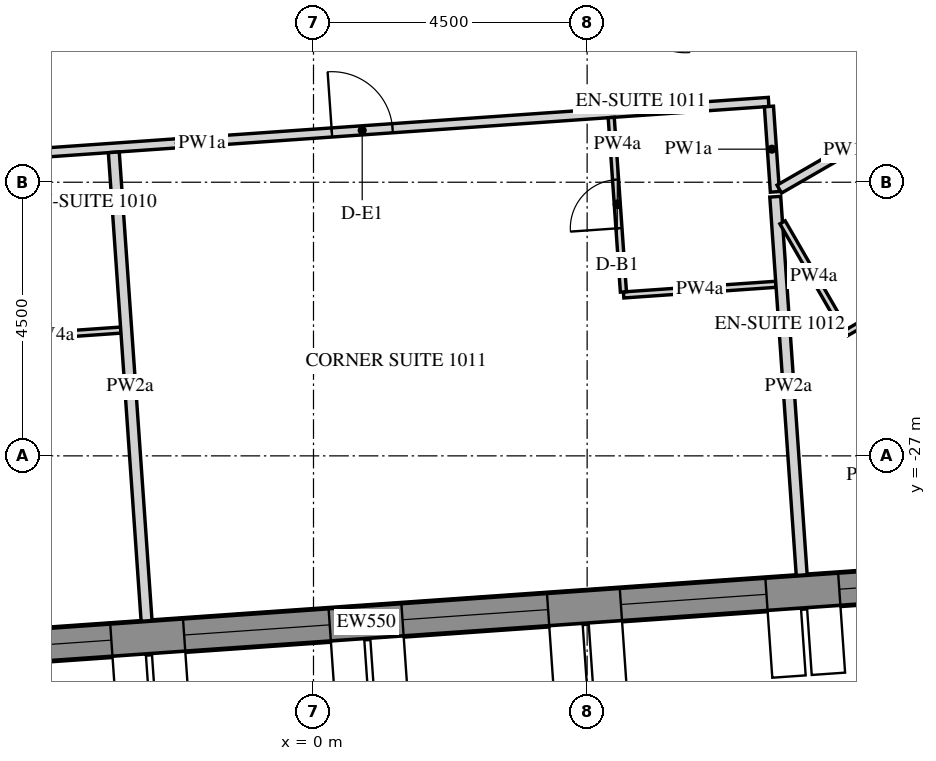
"""IFC4 building model, lengths in metres.
Left out: names, types, materials, properties, quantities, classifications, styles, units other than length and angle.
Written with IfcOpenShell. Run it as: python <this file> out.ifc"""

import sys

from ifc_helpers import new_model, si_unit, direction, frame, frame_2d, origin, place, context, subcontext, project, spatial, polyline, rectangle, outline, extrude, element, fill, save


model = new_model("IFC4")
c1 = context("Model", 3, precision=1e-05, world=origin(), true_north=direction((0.0, 1.0)))
c2 = subcontext(c1, "Body", "Model", "MODEL_VIEW")
j1 = project(units=[si_unit("LENGTHUNIT", "METRE"), si_unit("PLANEANGLEUNIT", "RADIAN")], contexts=[c1])
p1 = place(None, origin())
s1 = spatial("IfcSite", under=j1, at=p1, CompositionType="ELEMENT")
p2 = place(p1, origin())
s2 = spatial("IfcBuilding", under=s1, at=p2, CompositionType="ELEMENT")
p3 = place(p2, frame((0.0, 0.0, 135.0)))
s3 = spatial("IfcBuildingStorey", under=s2, at=p3, CompositionType="ELEMENT", Elevation=135.0)
p4 = place(p3, frame((-14.134, -30.786, -0.15), z_axis=(0.0, 0.0, 1.0), x_axis=(0.997564037441, 0.069756657061, 0.0)))
e1 = element("IfcWall", 1, at=p4, inside=s3, PredefinedType="SOLIDWALL", context=c2, shape_type="SweptSolid", body=[
    extrude(outline(polyline([(-0.026, -0.275), (30.094, -0.275), (30.049, 0.275), (0.026, 0.275), (-0.026, -0.275)])), origin(), (0.0, 0.0, 1.0), 3.9),
])
p5 = place(p4, frame((1.236, 0.0, 1.05)))
e2 = element("IfcOpeningElement", 2, at=p5, cuts=e1, PredefinedType="OPENING", context=c2, shape_type="SweptSolid", body=[
    extrude(rectangle(XDim=2.4, YDim=2.4, at=frame_2d((1.2, 1.2))), frame((0.0, 0.285, 0.0), z_axis=(0.0, -1.0, 0.0), x_axis=(1.0, 0.0, 0.0)), (0.0, 0.0, 1.0), 0.57),
])
p6 = place(p4, frame((4.835, 0.0, 1.05)))
e3 = element("IfcOpeningElement", 3, at=p6, cuts=e1, PredefinedType="OPENING", context=c2, shape_type="SweptSolid", body=[
    extrude(rectangle(XDim=2.4, YDim=2.4, at=frame_2d((1.2, 1.2))), frame((0.0, 0.285, 0.0), z_axis=(0.0, -1.0, 0.0), x_axis=(1.0, 0.0, 0.0)), (0.0, 0.0, 1.0), 0.57),
])
p7 = place(p4, frame((8.436, 0.0, 1.05)))
e4 = element("IfcOpeningElement", 4, at=p7, cuts=e1, PredefinedType="OPENING", context=c2, shape_type="SweptSolid", body=[
    extrude(rectangle(XDim=2.4, YDim=2.4, at=frame_2d((1.2, 1.2))), frame((0.0, 0.285, 0.0), z_axis=(0.0, -1.0, 0.0), x_axis=(1.0, 0.0, 0.0)), (0.0, 0.0, 1.0), 0.57),
])
p8 = place(p4, frame((12.035, 0.0, 1.05)))
e5 = element("IfcOpeningElement", 5, at=p8, cuts=e1, PredefinedType="OPENING", context=c2, shape_type="SweptSolid", body=[
    extrude(rectangle(XDim=2.4, YDim=2.4, at=frame_2d((1.2, 1.2))), frame((0.0, 0.285, 0.0), z_axis=(0.0, -1.0, 0.0), x_axis=(1.0, 0.0, 0.0)), (0.0, 0.0, 1.0), 0.57),
])
p9 = place(p4, frame((15.635, 0.0, 1.05)))
e6 = element("IfcOpeningElement", 6, at=p9, cuts=e1, PredefinedType="OPENING", context=c2, shape_type="SweptSolid", body=[
    extrude(rectangle(XDim=2.4, YDim=2.4, at=frame_2d((1.2, 1.2))), frame((0.0, 0.285, 0.0), z_axis=(0.0, -1.0, 0.0), x_axis=(1.0, 0.0, 0.0)), (0.0, 0.0, 1.0), 0.57),
])
p10 = place(p4, frame((19.236, 0.0, 1.05)))
e7 = element("IfcOpeningElement", 7, at=p10, cuts=e1, PredefinedType="OPENING", context=c2, shape_type="SweptSolid", body=[
    extrude(rectangle(XDim=2.4, YDim=2.4, at=frame_2d((1.2, 1.2))), frame((0.0, 0.285, 0.0), z_axis=(0.0, -1.0, 0.0), x_axis=(1.0, 0.0, 0.0)), (0.0, 0.0, 1.0), 0.57),
])
p11 = place(p4, frame((22.835, 0.0, 1.05)))
e8 = element("IfcOpeningElement", 8, at=p11, cuts=e1, PredefinedType="OPENING", context=c2, shape_type="SweptSolid", body=[
    extrude(rectangle(XDim=2.4, YDim=2.4, at=frame_2d((1.2, 1.2))), frame((0.0, 0.285, 0.0), z_axis=(0.0, -1.0, 0.0), x_axis=(1.0, 0.0, 0.0)), (0.0, 0.0, 1.0), 0.57),
])
p12 = place(p4, frame((26.436, 0.0, 1.05)))
e9 = element("IfcOpeningElement", 9, at=p12, cuts=e1, PredefinedType="OPENING", context=c2, shape_type="SweptSolid", body=[
    extrude(rectangle(XDim=2.4, YDim=2.4, at=frame_2d((1.2, 1.2))), frame((0.0, 0.285, 0.0), z_axis=(0.0, -1.0, 0.0), x_axis=(1.0, 0.0, 0.0)), (0.0, 0.0, 1.0), 0.57),
])
p13 = place(p3, frame((8.083, -14.0, -0.15), z_axis=(0.0, 0.0, 1.0), x_axis=(0.499997680643, -0.866026742862, 0.0)))
e10 = element("IfcWall", 10, at=p13, inside=s3, PredefinedType="SHEAR", context=c2, shape_type="SweptSolid", body=[
    extrude(rectangle(XDim=16.509, YDim=0.6, at=frame_2d((8.254, 0.0))), origin(), (0.0, 0.0, 1.0), 3.9),
])
p14 = place(p13, frame((7.354, 0.0, 0.15)))
e11 = element("IfcOpeningElement", 11, at=p14, cuts=e10, PredefinedType="OPENING", context=c2, shape_type="SweptSolid", body=[
    extrude(rectangle(XDim=1.8, YDim=2.4, at=frame_2d((0.9, 1.2))), frame((0.0, 0.31, 0.0), z_axis=(0.0, -1.0, 0.0), x_axis=(1.0, 0.0, 0.0)), (0.0, 0.0, 1.0), 0.62),
])
p15 = place(p3, frame((-11.902, -22.535, 0.0), z_axis=(0.0, 0.0, 1.0), x_axis=(0.997563830208, 0.069759620556, 0.0)))
e12 = element("IfcWall", 12, at=p15, inside=s3, PredefinedType="PARTITIONING", context=c2, shape_type="SweptSolid", body=[
    extrude(rectangle(XDim=19.434, YDim=0.15, at=frame_2d((9.717, 0.0))), origin(), (0.0, 0.0, 1.0), 2.838),
])
p16 = place(p15, frame((2.575, 0.0, 0.0)))
e13 = element("IfcOpeningElement", 13, at=p16, cuts=e12, PredefinedType="OPENING", context=c2, shape_type="SweptSolid", body=[
    extrude(rectangle(XDim=1.0, YDim=2.1, at=frame_2d((0.5, 1.05))), frame((0.0, 0.085, 0.0), z_axis=(0.0, -1.0, 0.0), x_axis=(1.0, 0.0, 0.0)), (0.0, 0.0, 1.0), 0.17),
])
p17 = place(p15, frame((12.234, 0.0, 0.0)))
e14 = element("IfcOpeningElement", 14, at=p17, cuts=e12, PredefinedType="OPENING", context=c2, shape_type="SweptSolid", body=[
    extrude(rectangle(XDim=1.0, YDim=2.1, at=frame_2d((0.5, 1.05))), frame((0.0, 0.085, 0.0), z_axis=(0.0, -1.0, 0.0), x_axis=(1.0, 0.0, 0.0)), (0.0, 0.0, 1.0), 0.17),
])
p18 = place(p3, frame((7.49, -21.254, 0.0), z_axis=(0.0, 0.0, 1.0), x_axis=(0.069718673592, -0.997566692784, 0.0)))
e15 = element("IfcWall", 15, at=p18, inside=s3, PredefinedType="PARTITIONING", context=c2, shape_type="SweptSolid", body=[
    extrude(rectangle(XDim=1.408, YDim=0.15, at=frame_2d((0.704, 0.0))), origin(), (0.0, 0.0, 1.0), 2.838),
])
p19 = place(p3, frame((7.66, -22.613, 0.0), z_axis=(0.0, 0.0, 1.0), x_axis=(0.866003870164, 0.500037295471, 0.0)))
e16 = element("IfcWall", 16, at=p19, inside=s3, PredefinedType="PARTITIONING", context=c2, shape_type="SweptSolid", body=[
    extrude(rectangle(XDim=2.573, YDim=0.15, at=frame_2d((1.287, 0.0))), origin(), (0.0, 0.0, 1.0), 2.838),
])
p20 = place(p3, frame((-0.825, -19.956, 0.0), z_axis=(0.0, 0.0, 1.0), x_axis=(-0.997562587881, -0.069777383582, 0.0)))
e17 = element("IfcWall", 17, at=p20, inside=s3, PredefinedType="PARTITIONING", context=c2, shape_type="SweptSolid", body=[
    extrude(rectangle(XDim=10.189, YDim=0.15, at=frame_2d((5.094, 0.0))), origin(), (0.0, 0.0, 1.0), 2.838),
])
p21 = place(p3, frame((-3.17, -24.932, 0.0), z_axis=(0.0, 0.0, 1.0), x_axis=(-0.997564338377, -0.069752353356, 0.0)))
e18 = element("IfcWall", 18, at=p21, inside=s3, PredefinedType="PARTITIONING", context=c2, shape_type="SweptSolid", body=[
    extrude(rectangle(XDim=2.31, YDim=0.1, at=frame_2d((1.155, 0.0))), origin(), (0.0, 0.0, 1.0), 2.838),
])
p22 = place(p3, frame((-2.745, -29.714, 0.0), z_axis=(0.0, 0.0, 1.0), x_axis=(-0.069748931501, 0.997564577636, 0.0)))
e19 = element("IfcWall", 19, at=p22, inside=s3, PredefinedType="PARTITIONING", context=c2, shape_type="SweptSolid", body=[
    extrude(rectangle(XDim=7.725, YDim=0.18, at=frame_2d((3.863, 0.0))), origin(), (0.0, 0.0, 1.0), 2.838),
])
p23 = place(p3, frame((7.604, -24.178, 0.0), z_axis=(0.0, 0.0, 1.0), x_axis=(-0.997565196586, -0.069740078583, 0.0)))
e20 = element("IfcWall", 20, at=p23, inside=s3, PredefinedType="PARTITIONING", context=c2, shape_type="SweptSolid", body=[
    extrude(rectangle(XDim=2.51, YDim=0.1, at=frame_2d((1.255, 0.0))), origin(), (0.0, 0.0, 1.0), 2.838),
])
p24 = place(p3, frame((5.097, -24.304, 0.0), z_axis=(0.0, 0.0, 1.0), x_axis=(-0.069804620828, 0.99756068232, 0.0)))
e21 = element("IfcWall", 21, at=p24, inside=s3, PredefinedType="PARTITIONING", context=c2, shape_type="SweptSolid", body=[
    extrude(rectangle(XDim=2.875, YDim=0.1, at=frame_2d((1.438, 0.0))), origin(), (0.0, 0.0, 1.0), 2.838),
])
p25 = place(p24, frame((1.05, 0.0, 0.0)))
e22 = element("IfcOpeningElement", 22, at=p25, cuts=e21, PredefinedType="OPENING", context=c2, shape_type="SweptSolid", body=[
    extrude(rectangle(XDim=0.8, YDim=2.1, at=frame_2d((0.4, 1.05))), frame((0.0, 0.06, 0.0), z_axis=(0.0, -1.0, 0.0), x_axis=(1.0, 0.0, 0.0)), (0.0, 0.0, 1.0), 0.12),
])
p26 = place(p3, frame((8.029, -28.96, 0.0), z_axis=(0.0, 0.0, 1.0), x_axis=(-0.069750446855, 0.997564471683, 0.0)))
e23 = element("IfcWall", 23, at=p26, inside=s3, PredefinedType="PARTITIONING", context=c2, shape_type="SweptSolid", body=[
    extrude(rectangle(XDim=6.237, YDim=0.18, at=frame_2d((3.119, 0.0))), origin(), (0.0, 0.0, 1.0), 2.838),
])
p27 = place(p3, frame((11.123, -23.616, 0.0), z_axis=(0.0, 0.0, 1.0), x_axis=(-0.866034909742, -0.499983534837, 0.0)))
e24 = element("IfcWall", 24, at=p27, inside=s3, PredefinedType="PARTITIONING", context=c2, shape_type="SweptSolid", body=[
    extrude(rectangle(XDim=2.725, YDim=0.1, at=frame_2d((1.363, 0.0))), origin(), (0.0, 0.0, 1.0), 2.838),
])
p28 = place(p27, frame((1.065, 0.0, 0.0)))
e25 = element("IfcOpeningElement", 25, at=p28, cuts=e24, PredefinedType="OPENING", context=c2, shape_type="SweptSolid", body=[
    extrude(rectangle(XDim=0.8, YDim=2.1, at=frame_2d((0.4, 1.05))), frame((0.0, 0.06, 0.0), z_axis=(0.0, -1.0, 0.0), x_axis=(1.0, 0.0, 0.0)), (0.0, 0.0, 1.0), 0.12),
])
p29 = place(p3, frame((8.738, -24.935, 0.0), z_axis=(0.0, 0.0, 1.0), x_axis=(-0.500045446624, 0.865999163574, 0.0)))
e26 = element("IfcWall", 26, at=p29, inside=s3, PredefinedType="PARTITIONING", context=c2, shape_type="SweptSolid", body=[
    extrude(rectangle(XDim=2.05, YDim=0.1, at=frame_2d((1.025, 0.0))), origin(), (0.0, 0.0, 1.0), 2.838),
])
p30 = place(p7, frame((0.0, 0.205, 0.0)))
e27 = element("IfcWindow", 27, at=p30, inside=s3, PartitioningType="DOUBLE_PANEL_VERTICAL", PredefinedType="WINDOW", context=c2, shape_type="SweptSolid", body=[
    extrude(rectangle(XDim=2.4, YDim=2.4, at=frame_2d((1.2, 1.2))), frame((0.0, 0.03, 0.0), z_axis=(0.0, -1.0, 0.0), x_axis=(1.0, 0.0, 0.0)), (0.0, 0.0, 1.0), 0.06),
])
fill(e4, e27)
p31 = place(p8, frame((0.0, 0.205, 0.0)))
e28 = element("IfcWindow", 28, at=p31, inside=s3, PartitioningType="DOUBLE_PANEL_VERTICAL", PredefinedType="WINDOW", context=c2, shape_type="SweptSolid", body=[
    extrude(rectangle(XDim=2.4, YDim=2.4, at=frame_2d((1.2, 1.2))), frame((0.0, 0.03, 0.0), z_axis=(0.0, -1.0, 0.0), x_axis=(1.0, 0.0, 0.0)), (0.0, 0.0, 1.0), 0.06),
])
fill(e5, e28)
p32 = place(p9, frame((0.0, 0.205, 0.0)))
e29 = element("IfcWindow", 29, at=p32, inside=s3, PartitioningType="DOUBLE_PANEL_VERTICAL", PredefinedType="WINDOW", context=c2, shape_type="SweptSolid", body=[
    extrude(rectangle(XDim=2.4, YDim=2.4, at=frame_2d((1.2, 1.2))), frame((0.0, 0.03, 0.0), z_axis=(0.0, -1.0, 0.0), x_axis=(1.0, 0.0, 0.0)), (0.0, 0.0, 1.0), 0.06),
])
fill(e6, e29)
p33 = place(p10, frame((0.0, 0.205, 0.0)))
e30 = element("IfcWindow", 30, at=p33, inside=s3, PartitioningType="DOUBLE_PANEL_VERTICAL", PredefinedType="WINDOW", context=c2, shape_type="SweptSolid", body=[
    extrude(rectangle(XDim=2.4, YDim=2.4, at=frame_2d((1.2, 1.2))), frame((0.0, 0.03, 0.0), z_axis=(0.0, -1.0, 0.0), x_axis=(1.0, 0.0, 0.0)), (0.0, 0.0, 1.0), 0.06),
])
fill(e7, e30)
p34 = place(p11, frame((0.0, 0.205, 0.0)))
e31 = element("IfcWindow", 31, at=p34, inside=s3, PartitioningType="DOUBLE_PANEL_VERTICAL", PredefinedType="WINDOW", context=c2, shape_type="SweptSolid", body=[
    extrude(rectangle(XDim=2.4, YDim=2.4, at=frame_2d((1.2, 1.2))), frame((0.0, 0.03, 0.0), z_axis=(0.0, -1.0, 0.0), x_axis=(1.0, 0.0, 0.0)), (0.0, 0.0, 1.0), 0.06),
])
fill(e8, e31)
p35 = place(p17, origin())
e32 = element("IfcDoor", 32, at=p35, inside=s3, OperationType="SINGLE_SWING_LEFT", PredefinedType="DOOR", context=c2, shape_type="SweptSolid", body=[
    extrude(rectangle(XDim=1.0, YDim=2.1, at=frame_2d((0.5, 1.05))), frame((0.0, 0.025, 0.0), z_axis=(0.0, -1.0, 0.0), x_axis=(1.0, 0.0, 0.0)), (0.0, 0.0, 1.0), 0.05),
])
fill(e14, e32)
p36 = place(p25, origin())
e33 = element("IfcDoor", 33, at=p36, inside=s3, OperationType="SINGLE_SWING_RIGHT", PredefinedType="DOOR", context=c2, shape_type="SweptSolid", body=[
    extrude(rectangle(XDim=0.8, YDim=2.1, at=frame_2d((0.4, 1.05))), frame((0.0, 0.025, 0.0), z_axis=(0.0, -1.0, 0.0), x_axis=(1.0, 0.0, 0.0)), (0.0, 0.0, 1.0), 0.05),
])
fill(e22, e33)
save(model, sys.argv[1])
